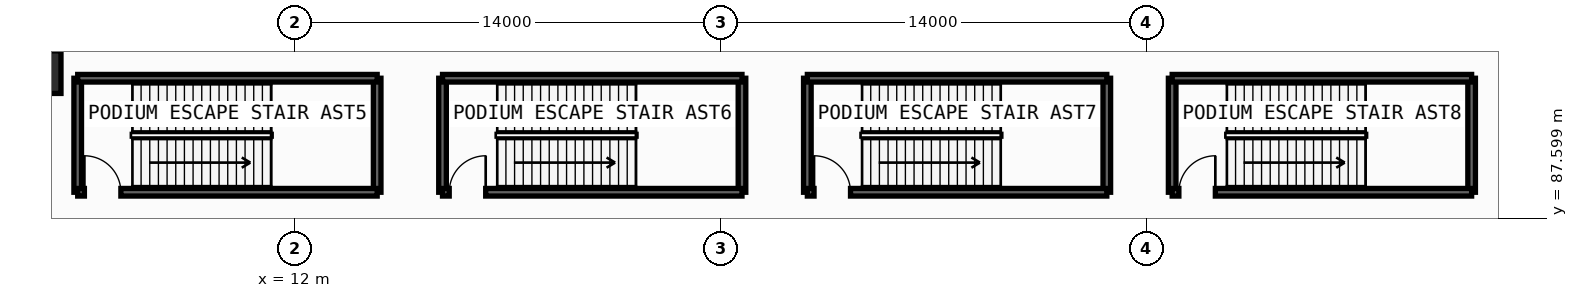
"""IFC4 building model, lengths in metres.
Left out: names, types, materials, properties, quantities, classifications, styles, units other than length and angle.
Written with IfcOpenShell. Run it as: python <this file> out.ifc"""

import sys

from ifc_helpers import new_model, si_unit, direction, frame, frame_2d, origin, origin_2d, place, context, subcontext, project, spatial, rectangle, extrude, element, fill, save


model = new_model("IFC4")
c1 = context("Model", 3, precision=1e-05, world=origin(), true_north=direction((0.0, 1.0)))
c2 = subcontext(c1, "Body", "Model", "MODEL_VIEW")
j1 = project(units=[si_unit("LENGTHUNIT", "METRE"), si_unit("PLANEANGLEUNIT", "RADIAN")], contexts=[c1])
p1 = place(None, origin())
s1 = spatial("IfcSite", under=j1, at=p1, CompositionType="ELEMENT")
p2 = place(p1, origin())
s2 = spatial("IfcBuilding", under=s1, at=p2, CompositionType="ELEMENT")
p3 = place(p2, frame((0.0, 0.0, -6.0)))
s3 = spatial("IfcBuildingStorey", under=s2, at=p3, CompositionType="ELEMENT", Elevation=-6.0)
p4 = place(p3, frame((3.6, 92.4, -0.6), z_axis=(0.0, 0.0, 1.0), x_axis=(1.0, 0.0, 0.0)))
e1 = element("IfcColumn", 1, at=p4, inside=s3, PredefinedType="COLUMN", context=c2, shape_type="SweptSolid", body=[
    extrude(rectangle(XDim=1.4, YDim=1.4, at=origin_2d()), origin(), (0.0, 0.0, 1.0), 6.6),
])
for number, where, z_axis, x_axis in (
    (2, (4.85, 88.45, -0.6), (0.0, 0.0, 1.0), (0.0, 1.0, 0.0)),
    (3, (14.7, 88.45, -0.6), (0.0, 0.0, 1.0), (0.0, 1.0, 0.0)),
):
    element("IfcWall", number, at=place(p3, frame(where, z_axis=z_axis, x_axis=x_axis)), inside=s3, PredefinedType="SOLIDWALL", context=c2, shape_type="SweptSolid", body=[
        extrude(rectangle(XDim=3.75, YDim=0.25, at=frame_2d((1.875, 0.0))), origin(), (0.0, 0.0, 1.0), 6.2),
    ])
p5 = place(p3, frame((4.85, 92.2, -0.6), z_axis=(0.0, 0.0, 1.0), x_axis=(1.0, 0.0, 0.0)))
e4 = element("IfcWall", 4, at=p5, inside=s3, PredefinedType="SOLIDWALL", context=c2, shape_type="SweptSolid", body=[
    extrude(rectangle(XDim=9.85, YDim=0.25, at=frame_2d((4.925, 0.0))), origin(), (0.0, 0.0, 1.0), 6.2),
])
p6 = place(p3, frame((4.85, 88.45, -0.6), z_axis=(0.0, 0.0, 1.0), x_axis=(1.0, 0.0, 0.0)))
e5 = element("IfcWall", 5, at=p6, inside=s3, PredefinedType="SOLIDWALL", context=c2, shape_type="SweptSolid", body=[
    extrude(rectangle(XDim=9.85, YDim=0.25, at=frame_2d((4.925, 0.0))), origin(), (0.0, 0.0, 1.0), 6.2),
])
p7 = place(p6, frame((0.22, 0.0, 0.6)))
e6 = element("IfcOpeningElement", 6, at=p7, cuts=e5, PredefinedType="OPENING", context=c2, shape_type="SweptSolid", body=[
    extrude(rectangle(XDim=1.2, YDim=2.2, at=frame_2d((0.6, 1.1))), frame((0.0, 0.135, 0.0), z_axis=(0.0, -1.0, 0.0), x_axis=(1.0, 0.0, 0.0)), (0.0, 0.0, 1.0), 0.27),
])
for number, where, z_axis, x_axis in (
    (7, (16.85, 88.45, -0.6), (0.0, 0.0, 1.0), (0.0, 1.0, 0.0)),
    (8, (26.7, 88.45, -0.6), (0.0, 0.0, 1.0), (0.0, 1.0, 0.0)),
):
    element("IfcWall", number, at=place(p3, frame(where, z_axis=z_axis, x_axis=x_axis)), inside=s3, PredefinedType="SOLIDWALL", context=c2, shape_type="SweptSolid", body=[
        extrude(rectangle(XDim=3.75, YDim=0.25, at=frame_2d((1.875, 0.0))), origin(), (0.0, 0.0, 1.0), 6.2),
    ])
p8 = place(p3, frame((16.85, 92.2, -0.6), z_axis=(0.0, 0.0, 1.0), x_axis=(1.0, 0.0, 0.0)))
e9 = element("IfcWall", 9, at=p8, inside=s3, PredefinedType="SOLIDWALL", context=c2, shape_type="SweptSolid", body=[
    extrude(rectangle(XDim=9.85, YDim=0.25, at=frame_2d((4.925, 0.0))), origin(), (0.0, 0.0, 1.0), 6.2),
])
p9 = place(p3, frame((16.85, 88.45, -0.6), z_axis=(0.0, 0.0, 1.0), x_axis=(1.0, 0.0, 0.0)))
e10 = element("IfcWall", 10, at=p9, inside=s3, PredefinedType="SOLIDWALL", context=c2, shape_type="SweptSolid", body=[
    extrude(rectangle(XDim=9.85, YDim=0.25, at=frame_2d((4.925, 0.0))), origin(), (0.0, 0.0, 1.0), 6.2),
])
p10 = place(p9, frame((0.22, 0.0, 0.6)))
e11 = element("IfcOpeningElement", 11, at=p10, cuts=e10, PredefinedType="OPENING", context=c2, shape_type="SweptSolid", body=[
    extrude(rectangle(XDim=1.2, YDim=2.2, at=frame_2d((0.6, 1.1))), frame((0.0, 0.135, 0.0), z_axis=(0.0, -1.0, 0.0), x_axis=(1.0, 0.0, 0.0)), (0.0, 0.0, 1.0), 0.27),
])
for number, where, z_axis, x_axis in (
    (12, (28.85, 88.45, -0.6), (0.0, 0.0, 1.0), (0.0, 1.0, 0.0)),
    (13, (38.7, 88.45, -0.6), (0.0, 0.0, 1.0), (0.0, 1.0, 0.0)),
):
    element("IfcWall", number, at=place(p3, frame(where, z_axis=z_axis, x_axis=x_axis)), inside=s3, PredefinedType="SOLIDWALL", context=c2, shape_type="SweptSolid", body=[
        extrude(rectangle(XDim=3.75, YDim=0.25, at=frame_2d((1.875, 0.0))), origin(), (0.0, 0.0, 1.0), 6.2),
    ])
p11 = place(p3, frame((28.85, 92.2, -0.6), z_axis=(0.0, 0.0, 1.0), x_axis=(1.0, 0.0, 0.0)))
e14 = element("IfcWall", 14, at=p11, inside=s3, PredefinedType="SOLIDWALL", context=c2, shape_type="SweptSolid", body=[
    extrude(rectangle(XDim=9.85, YDim=0.25, at=frame_2d((4.925, 0.0))), origin(), (0.0, 0.0, 1.0), 6.2),
])
p12 = place(p3, frame((28.85, 88.45, -0.6), z_axis=(0.0, 0.0, 1.0), x_axis=(1.0, 0.0, 0.0)))
e15 = element("IfcWall", 15, at=p12, inside=s3, PredefinedType="SOLIDWALL", context=c2, shape_type="SweptSolid", body=[
    extrude(rectangle(XDim=9.85, YDim=0.25, at=frame_2d((4.925, 0.0))), origin(), (0.0, 0.0, 1.0), 6.2),
])
p13 = place(p12, frame((0.22, 0.0, 0.6)))
e16 = element("IfcOpeningElement", 16, at=p13, cuts=e15, PredefinedType="OPENING", context=c2, shape_type="SweptSolid", body=[
    extrude(rectangle(XDim=1.2, YDim=2.2, at=frame_2d((0.6, 1.1))), frame((0.0, 0.135, 0.0), z_axis=(0.0, -1.0, 0.0), x_axis=(1.0, 0.0, 0.0)), (0.0, 0.0, 1.0), 0.27),
])
for number, where, z_axis, x_axis in (
    (17, (40.85, 88.45, -0.6), (0.0, 0.0, 1.0), (0.0, 1.0, 0.0)),
    (18, (50.7, 88.45, -0.6), (0.0, 0.0, 1.0), (0.0, 1.0, 0.0)),
):
    element("IfcWall", number, at=place(p3, frame(where, z_axis=z_axis, x_axis=x_axis)), inside=s3, PredefinedType="SOLIDWALL", context=c2, shape_type="SweptSolid", body=[
        extrude(rectangle(XDim=3.75, YDim=0.25, at=frame_2d((1.875, 0.0))), origin(), (0.0, 0.0, 1.0), 6.2),
    ])
p14 = place(p3, frame((40.85, 92.2, -0.6), z_axis=(0.0, 0.0, 1.0), x_axis=(1.0, 0.0, 0.0)))
e19 = element("IfcWall", 19, at=p14, inside=s3, PredefinedType="SOLIDWALL", context=c2, shape_type="SweptSolid", body=[
    extrude(rectangle(XDim=9.85, YDim=0.25, at=frame_2d((4.925, 0.0))), origin(), (0.0, 0.0, 1.0), 6.2),
])
p15 = place(p3, frame((40.85, 88.45, -0.6), z_axis=(0.0, 0.0, 1.0), x_axis=(1.0, 0.0, 0.0)))
e20 = element("IfcWall", 20, at=p15, inside=s3, PredefinedType="SOLIDWALL", context=c2, shape_type="SweptSolid", body=[
    extrude(rectangle(XDim=9.85, YDim=0.25, at=frame_2d((4.925, 0.0))), origin(), (0.0, 0.0, 1.0), 6.2),
])
p16 = place(p15, frame((0.22, 0.0, 0.6)))
e21 = element("IfcOpeningElement", 21, at=p16, cuts=e20, PredefinedType="OPENING", context=c2, shape_type="SweptSolid", body=[
    extrude(rectangle(XDim=1.2, YDim=2.2, at=frame_2d((0.6, 1.1))), frame((0.0, 0.135, 0.0), z_axis=(0.0, -1.0, 0.0), x_axis=(1.0, 0.0, 0.0)), (0.0, 0.0, 1.0), 0.27),
])
p17 = place(p7, origin())
e22 = element("IfcDoor", 22, at=p17, inside=s3, OperationType="SINGLE_SWING_LEFT", PredefinedType="USERDEFINED", context=c2, shape_type="SweptSolid", body=[
    extrude(rectangle(XDim=1.2, YDim=2.2, at=frame_2d((0.6, 1.1))), frame((0.0, 0.025, 0.0), z_axis=(0.0, -1.0, 0.0), x_axis=(1.0, 0.0, 0.0)), (0.0, 0.0, 1.0), 0.05),
])
fill(e6, e22)
p18 = place(p10, origin())
e23 = element("IfcDoor", 23, at=p18, inside=s3, OperationType="SINGLE_SWING_RIGHT", PredefinedType="USERDEFINED", context=c2, shape_type="SweptSolid", body=[
    extrude(rectangle(XDim=1.2, YDim=2.2, at=frame_2d((0.6, 1.1))), frame((0.0, 0.025, 0.0), z_axis=(0.0, -1.0, 0.0), x_axis=(1.0, 0.0, 0.0)), (0.0, 0.0, 1.0), 0.05),
])
fill(e11, e23)
p19 = place(p13, origin())
e24 = element("IfcDoor", 24, at=p19, inside=s3, OperationType="SINGLE_SWING_LEFT", PredefinedType="USERDEFINED", context=c2, shape_type="SweptSolid", body=[
    extrude(rectangle(XDim=1.2, YDim=2.2, at=frame_2d((0.6, 1.1))), frame((0.0, 0.025, 0.0), z_axis=(0.0, -1.0, 0.0), x_axis=(1.0, 0.0, 0.0)), (0.0, 0.0, 1.0), 0.05),
])
fill(e16, e24)
p20 = place(p16, origin())
e25 = element("IfcDoor", 25, at=p20, inside=s3, OperationType="SINGLE_SWING_RIGHT", PredefinedType="USERDEFINED", context=c2, shape_type="SweptSolid", body=[
    extrude(rectangle(XDim=1.2, YDim=2.2, at=frame_2d((0.6, 1.1))), frame((0.0, 0.025, 0.0), z_axis=(0.0, -1.0, 0.0), x_axis=(1.0, 0.0, 0.0)), (0.0, 0.0, 1.0), 0.05),
])
fill(e21, e25)
save(model, sys.argv[1])
